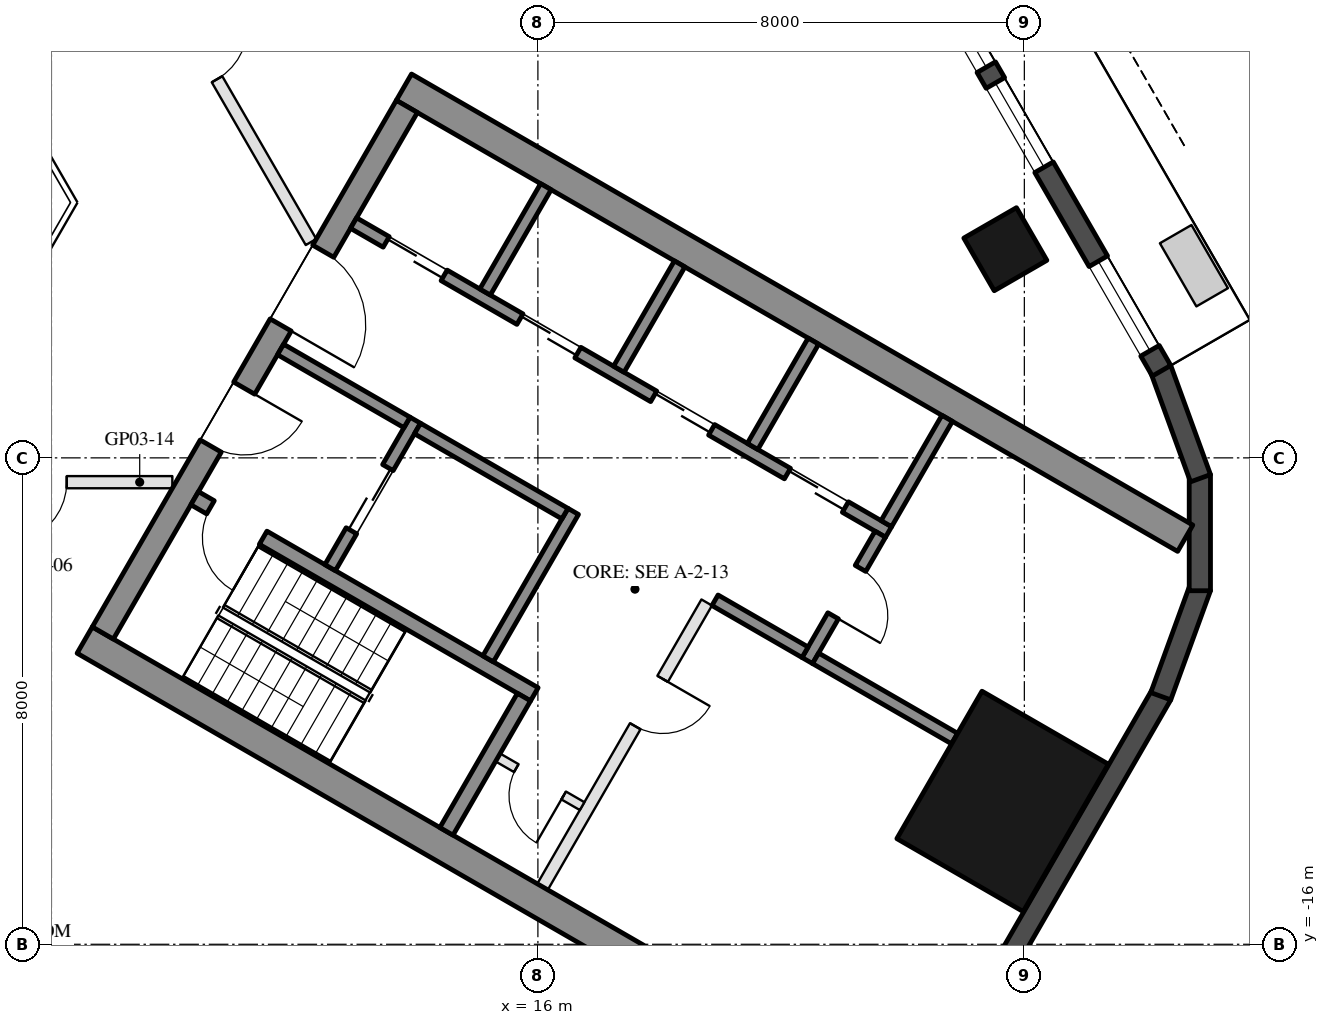
"""IFC4 building model, lengths in metres.
Left out: names, types, materials, properties, quantities, classifications, styles, units other than length and angle.
Written with IfcOpenShell. Run it as: python <this file> out.ifc"""

import sys

from ifc_helpers import new_model, si_unit, direction, frame, frame_2d, origin, origin_2d, place, context, subcontext, project, spatial, rectangle, hollow_rectangle, extrude, element, fill, save


model = new_model("IFC4")
c1 = context("Model", 3, precision=1e-05, world=origin(), true_north=direction((0.0, 1.0)))
c2 = subcontext(c1, "Body", "Model", "MODEL_VIEW")
j1 = project(units=[si_unit("LENGTHUNIT", "METRE"), si_unit("PLANEANGLEUNIT", "RADIAN")], contexts=[c1])
p1 = place(None, origin())
s1 = spatial("IfcSite", under=j1, at=p1, CompositionType="ELEMENT")
p2 = place(p1, origin())
s2 = spatial("IfcBuilding", under=s1, at=p2, CompositionType="ELEMENT")
p3 = place(p2, frame((0.0, 0.0, 65.0)))
s3 = spatial("IfcBuildingStorey", under=s2, at=p3, CompositionType="ELEMENT", Elevation=65.0)
p4 = place(p3, frame((23.688, -4.568, 0.0), z_axis=(0.0, 0.0, 1.0), x_axis=(-0.5, 0.866025403784, 0.0)))
e1 = element("IfcColumn", 1, at=p4, inside=s3, PredefinedType="COLUMN", context=c2, shape_type="SweptSolid", body=[
    extrude(hollow_rectangle(XDim=1.0, YDim=1.0, WallThickness=0.045, at=origin_2d()), origin(), (0.0, 0.0, 1.0), 3.7),
])
p5 = place(p3, frame((23.643, -13.65, 0.0), z_axis=(0.0, 0.0, 1.0), x_axis=(0.5, 0.866025403784, 0.0)))
e2 = element("IfcColumn", 2, at=p5, inside=s3, PredefinedType="COLUMN", context=c2, shape_type="SweptSolid", body=[
    extrude(hollow_rectangle(XDim=2.8, YDim=2.4, WallThickness=0.07, at=origin_2d()), origin(), (0.0, 0.0, 1.0), 3.7),
])
p6 = place(p3, frame((23.427, -16.792, 0.0), z_axis=(0.0, 0.0, 1.0), x_axis=(0.500018773155, 0.866014564827, 0.0)))
e3 = element("IfcWall", 3, at=p6, inside=s3, PredefinedType="SOLIDWALL", context=c2, shape_type="SweptSolid", body=[
    extrude(rectangle(XDim=5.658, YDim=0.35, at=frame_2d((2.829, 0.0))), origin(), (0.0, 0.0, 1.0), 3.55),
])
for number, where, z_axis, x_axis in (
    (4, (26.244, -11.92, 0.0), (0.0, 0.0, 1.0), (0.342, 0.94, 0.0)),
    (5, (26.886, -10.185, 0.0), (0.0, 0.0, 1.0), (0.0, 1.0, 0.0)),
    (6, (26.897, -8.335, 0.0), (0.0, 0.0, 1.0), (-0.342, 0.94, 0.0)),
):
    element("IfcWall", number, at=place(p3, frame(where, z_axis=z_axis, x_axis=x_axis)), inside=s3, PredefinedType="SOLIDWALL", context=c2, shape_type="SweptSolid", body=[
        extrude(rectangle(XDim=1.91, YDim=0.35, at=frame_2d((0.955, 0.0))), origin(), (0.0, 0.0, 1.0), 3.55),
    ])
p7 = place(p3, frame((26.257, -6.567, 0.0), z_axis=(0.0, 0.0, 1.0), x_axis=(-0.500023526245, 0.866011820475, 0.0)))
e7 = element("IfcWall", 7, at=p7, inside=s3, PredefinedType="SOLIDWALL", context=c2, shape_type="SweptSolid", body=[
    extrude(rectangle(XDim=11.816, YDim=0.35, at=frame_2d((5.908, 0.0))), origin(), (0.0, 0.0, 1.0), 3.55),
])
p8 = place(p7, frame((0.38, 0.0, 0.3)))
e8 = element("IfcOpeningElement", 8, at=p8, cuts=e7, PredefinedType="OPENING", context=c2, shape_type="SweptSolid", body=[
    extrude(rectangle(XDim=1.7, YDim=2.65, at=frame_2d((0.85, 1.325))), frame((0.0, 0.185, 0.0), z_axis=(0.0, -1.0, 0.0), x_axis=(1.0, 0.0, 0.0)), (0.0, 0.0, 1.0), 0.37),
])
p9 = place(p7, frame((7.666, 0.0, 0.0)))
e9 = element("IfcOpeningElement", 9, at=p9, cuts=e7, PredefinedType="OPENING", context=c2, shape_type="SweptSolid", body=[
    extrude(rectangle(XDim=2.4, YDim=2.4, at=frame_2d((1.2, 1.2))), frame((0.0, 0.185, 0.0), z_axis=(0.0, -1.0, 0.0), x_axis=(1.0, 0.0, 0.0)), (0.0, 0.0, 1.0), 0.37),
])
p10 = place(p7, frame((3.865, 0.0, 0.3)))
e10 = element("IfcOpeningElement", 10, at=p10, cuts=e7, PredefinedType="OPENING", context=c2, shape_type="SweptSolid", body=[
    extrude(rectangle(XDim=1.6, YDim=2.65, at=frame_2d((0.8, 1.325))), frame((0.0, 0.185, 0.0), z_axis=(0.0, -1.0, 0.0), x_axis=(1.0, 0.0, 0.0)), (0.0, 0.0, 1.0), 0.37),
])
p11 = place(p7, frame((5.765, 0.0, 0.3)))
e11 = element("IfcOpeningElement", 11, at=p11, cuts=e7, PredefinedType="OPENING", context=c2, shape_type="SweptSolid", body=[
    extrude(rectangle(XDim=1.6, YDim=2.65, at=frame_2d((0.8, 1.325))), frame((0.0, 0.185, 0.0), z_axis=(0.0, -1.0, 0.0), x_axis=(1.0, 0.0, 0.0)), (0.0, 0.0, 1.0), 0.37),
])
for number, where, z_axis, x_axis in (
    (12, (8.547, -10.997, 0.0), (0.0, 0.0, 1.0), (0.866, -0.5, 0.0)),
    (13, (13.797, -1.903, 0.0), (0.0, 0.0, 1.0), (0.866, -0.5, 0.0)),
):
    element("IfcWall", number, at=place(p3, frame(where, z_axis=z_axis, x_axis=x_axis)), inside=s3, PredefinedType="SHEAR", context=c2, shape_type="SweptSolid", body=[
        extrude(rectangle(XDim=14.837, YDim=0.5, at=frame_2d((7.418, 0.0))), origin(), (0.0, 0.0, 1.0), 3.5),
    ])
p12 = place(p3, frame((8.845, -10.88, 0.0), z_axis=(0.0, 0.0, 1.0), x_axis=(0.500004234368, 0.866022959057, 0.0)))
e14 = element("IfcWall", 14, at=p12, inside=s3, PredefinedType="SHEAR", context=c2, shape_type="SweptSolid", body=[
    extrude(rectangle(XDim=10.0, YDim=0.4, at=frame_2d((5.0, 0.0))), origin(), (0.0, 0.0, 1.0), 3.5),
])
p13 = place(p12, frame((3.55, 0.0, 0.0)))
e15 = element("IfcOpeningElement", 15, at=p13, cuts=e14, PredefinedType="OPENING", context=c2, shape_type="SweptSolid", body=[
    extrude(rectangle(XDim=1.1, YDim=2.1, at=frame_2d((0.55, 1.05))), frame((0.0, 0.21, 0.0), z_axis=(0.0, -1.0, 0.0), x_axis=(1.0, 0.0, 0.0)), (0.0, 0.0, 1.0), 0.42),
])
p14 = place(p12, frame((5.85, 0.0, 0.0)))
e16 = element("IfcOpeningElement", 16, at=p14, cuts=e14, PredefinedType="OPENING", context=c2, shape_type="SweptSolid", body=[
    extrude(rectangle(XDim=1.4, YDim=2.1, at=frame_2d((0.7, 1.05))), frame((0.0, 0.21, 0.0), z_axis=(0.0, -1.0, 0.0), x_axis=(1.0, 0.0, 0.0)), (0.0, 0.0, 1.0), 0.42),
])
p15 = place(p3, frame((10.356, -8.664, 0.0), z_axis=(0.0, 0.0, 1.0), x_axis=(0.866028629588, -0.499994412703, 0.0)))
e17 = element("IfcWall", 17, at=p15, inside=s3, PredefinedType="SHEAR", context=c2, shape_type="SweptSolid", body=[
    extrude(rectangle(XDim=6.45, YDim=0.25, at=frame_2d((3.225, 0.0))), origin(), (0.0, 0.0, 1.0), 3.5),
])
p16 = place(p15, frame((0.3, 0.0, 0.0)))
e18 = element("IfcOpeningElement", 18, at=p16, cuts=e17, PredefinedType="OPENING", context=c2, shape_type="SweptSolid", body=[
    extrude(rectangle(XDim=1.0, YDim=2.1, at=frame_2d((0.5, 1.05))), frame((0.0, 0.135, 0.0), z_axis=(0.0, -1.0, 0.0), x_axis=(1.0, 0.0, 0.0)), (0.0, 0.0, 1.0), 0.27),
])
p17 = place(p3, frame((14.496, -14.143, 0.0), z_axis=(0.0, 0.0, 1.0), x_axis=(0.500062241894, 0.865989465428, 0.0)))
e19 = element("IfcWall", 19, at=p17, inside=s3, PredefinedType="SHEAR", context=c2, shape_type="SweptSolid", body=[
    extrude(rectangle(XDim=2.55, YDim=0.25, at=frame_2d((1.275, 0.0))), origin(), (0.0, 0.0, 1.0), 3.5),
])
p18 = place(p3, frame((15.181, -11.305, 0.0), z_axis=(0.0, 0.0, 1.0), x_axis=(0.49994636267, 0.866056369097, 0.0)))
e20 = element("IfcWall", 20, at=p18, inside=s3, PredefinedType="SHEAR", context=c2, shape_type="SweptSolid", body=[
    extrude(rectangle(XDim=2.8, YDim=0.2, at=frame_2d((1.4, 0.0))), origin(), (0.0, 0.0, 1.0), 3.5),
])
p19 = place(p3, frame((12.583, -9.805, 0.0), z_axis=(0.0, 0.0, 1.0), x_axis=(0.49994636267, 0.866056369097, 0.0)))
e21 = element("IfcWall", 21, at=p19, inside=s3, PredefinedType="SHEAR", context=c2, shape_type="SweptSolid", body=[
    extrude(rectangle(XDim=2.8, YDim=0.2, at=frame_2d((1.4, 0.0))), origin(), (0.0, 0.0, 1.0), 3.5),
])
p20 = place(p19, frame((0.7, 0.0, 0.0)))
e22 = element("IfcOpeningElement", 22, at=p20, cuts=e21, PredefinedType="OPENING", context=c2, shape_type="SweptSolid", body=[
    extrude(rectangle(XDim=1.2, YDim=2.1, at=frame_2d((0.6, 1.05))), frame((0.0, 0.11, 0.0), z_axis=(0.0, -1.0, 0.0), x_axis=(1.0, 0.0, 0.0)), (0.0, 0.0, 1.0), 0.22),
])
p21 = place(p3, frame((11.768, -6.217, 0.0), z_axis=(0.0, 0.0, 1.0), x_axis=(0.866050077142, -0.499957262057, 0.0)))
e23 = element("IfcWall", 23, at=p21, inside=s3, PredefinedType="SHEAR", context=c2, shape_type="SweptSolid", body=[
    extrude(rectangle(XDim=2.4, YDim=0.2, at=frame_2d((1.2, 0.0))), origin(), (0.0, 0.0, 1.0), 3.5),
])
p22 = place(p3, frame((14.02, -7.517, 0.0), z_axis=(0.0, 0.0, 1.0), x_axis=(0.866034573852, -0.49998411664, 0.0)))
e24 = element("IfcWall", 24, at=p22, inside=s3, PredefinedType="SHEAR", context=c2, shape_type="SweptSolid", body=[
    extrude(rectangle(XDim=2.8, YDim=0.2, at=frame_2d((1.4, 0.0))), origin(), (0.0, 0.0, 1.0), 3.5),
])
p23 = place(p3, frame((12.968, -4.138, 0.0), z_axis=(0.0, 0.0, 1.0), x_axis=(0.866028328073, -0.49999493495, 0.0)))
e25 = element("IfcWall", 25, at=p23, inside=s3, PredefinedType="SHEAR", context=c2, shape_type="SweptSolid", body=[
    extrude(rectangle(XDim=10.16, YDim=0.2, at=frame_2d((5.08, 0.0))), origin(), (0.0, 0.0, 1.0), 3.5),
])
p24 = place(p23, frame((0.62, 0.0, 0.0)))
e26 = element("IfcOpeningElement", 26, at=p24, cuts=e25, PredefinedType="OPENING", context=c2, shape_type="SweptSolid", body=[
    extrude(rectangle(XDim=1.1, YDim=2.1, at=frame_2d((0.55, 1.05))), frame((0.0, 0.11, 0.0), z_axis=(0.0, -1.0, 0.0), x_axis=(1.0, 0.0, 0.0)), (0.0, 0.0, 1.0), 0.22),
])
p25 = place(p23, frame((3.16, 0.0, 0.0)))
e27 = element("IfcOpeningElement", 27, at=p25, cuts=e25, PredefinedType="OPENING", context=c2, shape_type="SweptSolid", body=[
    extrude(rectangle(XDim=1.1, YDim=2.1, at=frame_2d((0.55, 1.05))), frame((0.0, 0.11, 0.0), z_axis=(0.0, -1.0, 0.0), x_axis=(1.0, 0.0, 0.0)), (0.0, 0.0, 1.0), 0.22),
])
p26 = place(p23, frame((5.7, 0.0, 0.0)))
e28 = element("IfcOpeningElement", 28, at=p26, cuts=e25, PredefinedType="OPENING", context=c2, shape_type="SweptSolid", body=[
    extrude(rectangle(XDim=1.1, YDim=2.1, at=frame_2d((0.55, 1.05))), frame((0.0, 0.11, 0.0), z_axis=(0.0, -1.0, 0.0), x_axis=(1.0, 0.0, 0.0)), (0.0, 0.0, 1.0), 0.22),
])
p27 = place(p23, frame((8.24, 0.0, 0.0)))
e29 = element("IfcOpeningElement", 29, at=p27, cuts=e25, PredefinedType="OPENING", context=c2, shape_type="SweptSolid", body=[
    extrude(rectangle(XDim=1.1, YDim=2.1, at=frame_2d((0.55, 1.05))), frame((0.0, 0.11, 0.0), z_axis=(0.0, -1.0, 0.0), x_axis=(1.0, 0.0, 0.0)), (0.0, 0.0, 1.0), 0.22),
])
p28 = place(p3, frame((20.43, -11.333, 0.0), z_axis=(0.0, 0.0, 1.0), x_axis=(0.500001309137, 0.866024647952, 0.0)))
e30 = element("IfcWall", 30, at=p28, inside=s3, PredefinedType="SHEAR", context=c2, shape_type="SweptSolid", body=[
    extrude(rectangle(XDim=2.4, YDim=0.2, at=frame_2d((1.2, 0.0))), origin(), (0.0, 0.0, 1.0), 3.5),
])
p29 = place(p28, frame((0.85, 0.0, 0.0)))
e31 = element("IfcOpeningElement", 31, at=p29, cuts=e30, PredefinedType="OPENING", context=c2, shape_type="SweptSolid", body=[
    extrude(rectangle(XDim=0.9, YDim=2.1, at=frame_2d((0.45, 1.05))), frame((0.0, 0.11, 0.0), z_axis=(0.0, -1.0, 0.0), x_axis=(1.0, 0.0, 0.0)), (0.0, 0.0, 1.0), 0.22),
])
p30 = place(p3, frame((18.913, -10.342, 0.0), z_axis=(0.0, 0.0, 1.0), x_axis=(0.866038183914, -0.499977863513, 0.0)))
e32 = element("IfcWall", 32, at=p30, inside=s3, PredefinedType="SHEAR", context=c2, shape_type="SweptSolid", body=[
    extrude(rectangle(XDim=1.71, YDim=0.2, at=frame_2d((0.855, 0.0))), origin(), (0.0, 0.0, 1.0), 3.5),
])
for number, where, z_axis, x_axis in (
    (33, (15.131, -5.272, 0.0), (0.0, 0.0, 1.0), (0.5, 0.866, 0.0)),
    (34, (17.331, -6.542, 0.0), (0.0, 0.0, 1.0), (0.5, 0.866, 0.0)),
    (35, (19.531, -7.812, 0.0), (0.0, 0.0, 1.0), (0.5, 0.866, 0.0)),
    (36, (21.73, -9.082, 0.0), (0.0, 0.0, 1.0), (0.5, 0.866, 0.0)),
):
    element("IfcWall", number, at=place(p3, frame(where, z_axis=z_axis, x_axis=x_axis)), inside=s3, PredefinedType="SHEAR", context=c2, shape_type="SweptSolid", body=[
        extrude(rectangle(XDim=2.0, YDim=0.2, at=frame_2d((1.0, 0.0))), origin(), (0.0, 0.0, 1.0), 3.5),
    ])
p31 = place(p3, frame((20.567, -11.297, 0.0), z_axis=(0.0, 0.0, 1.0), x_axis=(0.866060851709, -0.499938597367, 0.0)))
e37 = element("IfcWall", 37, at=p31, inside=s3, PredefinedType="SHEAR", context=c2, shape_type="SweptSolid", body=[
    extrude(rectangle(XDim=2.64, YDim=0.2, at=frame_2d((1.32, 0.0))), origin(), (0.0, 0.0, 1.0), 3.5),
])
p32 = place(p3, frame((16.076, -15.055, 0.0), z_axis=(0.0, 0.0, 1.0), x_axis=(0.499995103361, 0.866028230842, 0.0)))
e38 = element("IfcWall", 38, at=p32, inside=s3, PredefinedType="PARTITIONING", context=c2, shape_type="SweptSolid", body=[
    extrude(rectangle(XDim=5.4, YDim=0.2, at=frame_2d((2.7, 0.0))), origin(), (0.0, 0.0, 1.0), 3.5),
])
p33 = place(p32, frame((3.05, 0.0, 0.0)))
e39 = element("IfcOpeningElement", 39, at=p33, cuts=e38, PredefinedType="OPENING", context=c2, shape_type="SweptSolid", body=[
    extrude(rectangle(XDim=0.9, YDim=2.1, at=frame_2d((0.45, 1.05))), frame((0.0, 0.11, 0.0), z_axis=(0.0, -1.0, 0.0), x_axis=(1.0, 0.0, 0.0)), (0.0, 0.0, 1.0), 0.22),
])
p34 = place(p3, frame((15.342, -12.928, 0.0), z_axis=(0.0, 0.0, 1.0), x_axis=(0.865989903783, -0.500061482766, 0.0)))
e40 = element("IfcWall", 40, at=p34, inside=s3, PredefinedType="PARTITIONING", context=c2, shape_type="SweptSolid", body=[
    extrude(rectangle(XDim=1.6, YDim=0.15, at=frame_2d((0.8, 0.0))), origin(), (0.0, 0.0, 1.0), 3.5),
])
p35 = place(p34, frame((0.35, 0.0, 0.0)))
e41 = element("IfcOpeningElement", 41, at=p35, cuts=e40, PredefinedType="OPENING", context=c2, shape_type="SweptSolid", body=[
    extrude(rectangle(XDim=0.9, YDim=2.1, at=frame_2d((0.45, 1.05))), frame((0.0, 0.085, 0.0), z_axis=(0.0, -1.0, 0.0), x_axis=(1.0, 0.0, 0.0)), (0.0, 0.0, 1.0), 0.17),
])
p36 = place(p3, frame((9.988, -8.4, 0.0), z_axis=(0.0, 0.0, 1.0), x_axis=(-1.0, 0.0, 0.0)))
e42 = element("IfcWall", 42, at=p36, inside=s3, PredefinedType="PARTITIONING", context=c2, shape_type="SweptSolid", body=[
    extrude(rectangle(XDim=4.474, YDim=0.2, at=frame_2d((2.237, 0.0))), origin(), (0.0, 0.0, 1.0), 2.95),
])
p37 = place(p36, frame((1.737, 0.0, 0.0)))
e43 = element("IfcOpeningElement", 43, at=p37, cuts=e42, PredefinedType="OPENING", context=c2, shape_type="SweptSolid", body=[
    extrude(rectangle(XDim=1.0, YDim=2.1, at=frame_2d((0.5, 1.05))), frame((0.0, 0.11, 0.0), z_axis=(0.0, -1.0, 0.0), x_axis=(1.0, 0.0, 0.0)), (0.0, 0.0, 1.0), 0.22),
])
p38 = place(p3, frame((8.677, 1.771, 0.0), z_axis=(0.0, 0.0, 1.0), x_axis=(0.50000293509, -0.866023709203, 0.0)))
e44 = element("IfcWall", 44, at=p38, inside=s3, PredefinedType="PARTITIONING", context=c2, shape_type="SweptSolid", body=[
    extrude(rectangle(XDim=7.183, YDim=0.2, at=frame_2d((3.592, 0.0))), origin(), (0.0, 0.0, 1.0), 2.95),
])
p39 = place(p38, frame((3.092, 0.0, 0.0)))
e45 = element("IfcOpeningElement", 45, at=p39, cuts=e44, PredefinedType="OPENING", context=c2, shape_type="SweptSolid", body=[
    extrude(rectangle(XDim=1.0, YDim=2.1, at=frame_2d((0.5, 1.05))), frame((0.0, 0.11, 0.0), z_axis=(0.0, -1.0, 0.0), x_axis=(1.0, 0.0, 0.0)), (0.0, 0.0, 1.0), 0.22),
])
p40 = place(p8, origin())
e46 = element("IfcWindow", 46, at=p40, inside=s3, PartitioningType="SINGLE_PANEL", PredefinedType="WINDOW", context=c2, shape_type="SweptSolid", body=[
    extrude(rectangle(XDim=1.7, YDim=2.65, at=frame_2d((0.85, 1.325))), frame((0.0, 0.03, 0.0), z_axis=(0.0, -1.0, 0.0), x_axis=(1.0, 0.0, 0.0)), (0.0, 0.0, 1.0), 0.06),
])
fill(e8, e46)
p41 = place(p10, origin())
e47 = element("IfcWindow", 47, at=p41, inside=s3, PartitioningType="SINGLE_PANEL", PredefinedType="WINDOW", context=c2, shape_type="SweptSolid", body=[
    extrude(rectangle(XDim=1.6, YDim=2.65, at=frame_2d((0.8, 1.325))), frame((0.0, 0.03, 0.0), z_axis=(0.0, -1.0, 0.0), x_axis=(1.0, 0.0, 0.0)), (0.0, 0.0, 1.0), 0.06),
])
fill(e10, e47)
p42 = place(p11, origin())
e48 = element("IfcWindow", 48, at=p42, inside=s3, PartitioningType="SINGLE_PANEL", PredefinedType="WINDOW", context=c2, shape_type="SweptSolid", body=[
    extrude(rectangle(XDim=1.6, YDim=2.65, at=frame_2d((0.8, 1.325))), frame((0.0, 0.03, 0.0), z_axis=(0.0, -1.0, 0.0), x_axis=(1.0, 0.0, 0.0)), (0.0, 0.0, 1.0), 0.06),
])
fill(e11, e48)
p43 = place(p20, origin())
e49 = element("IfcDoor", 49, at=p43, inside=s3, OperationType="DOUBLE_DOOR_SLIDING", PredefinedType="DOOR", context=c2, shape_type="SweptSolid", body=[
    extrude(rectangle(XDim=1.2, YDim=2.1, at=frame_2d((0.6, 1.05))), frame((0.0, 0.025, 0.0), z_axis=(0.0, -1.0, 0.0), x_axis=(1.0, 0.0, 0.0)), (0.0, 0.0, 1.0), 0.05),
])
fill(e22, e49)
p44 = place(p35, frame((0.9, 0.0, 0.0), z_axis=(0.0, 0.0, 1.0), x_axis=(-1.0, 0.0, 0.0)))
e50 = element("IfcDoor", 50, at=p44, inside=s3, OperationType="SINGLE_SWING_LEFT", PredefinedType="DOOR", context=c2, shape_type="SweptSolid", body=[
    extrude(rectangle(XDim=0.9, YDim=2.1, at=frame_2d((0.45, 1.05))), frame((0.0, 0.025, 0.0), z_axis=(0.0, -1.0, 0.0), x_axis=(1.0, 0.0, 0.0)), (0.0, 0.0, 1.0), 0.05),
])
fill(e41, e50)
p45 = place(p24, origin())
e51 = element("IfcDoor", 51, at=p45, inside=s3, OperationType="DOUBLE_DOOR_SLIDING", PredefinedType="DOOR", context=c2, shape_type="SweptSolid", body=[
    extrude(rectangle(XDim=1.1, YDim=2.1, at=frame_2d((0.55, 1.05))), frame((0.0, 0.025, 0.0), z_axis=(0.0, -1.0, 0.0), x_axis=(1.0, 0.0, 0.0)), (0.0, 0.0, 1.0), 0.05),
])
fill(e26, e51)
p46 = place(p25, origin())
e52 = element("IfcDoor", 52, at=p46, inside=s3, OperationType="DOUBLE_DOOR_SLIDING", PredefinedType="DOOR", context=c2, shape_type="SweptSolid", body=[
    extrude(rectangle(XDim=1.1, YDim=2.1, at=frame_2d((0.55, 1.05))), frame((0.0, 0.025, 0.0), z_axis=(0.0, -1.0, 0.0), x_axis=(1.0, 0.0, 0.0)), (0.0, 0.0, 1.0), 0.05),
])
fill(e27, e52)
p47 = place(p26, origin())
e53 = element("IfcDoor", 53, at=p47, inside=s3, OperationType="DOUBLE_DOOR_SLIDING", PredefinedType="DOOR", context=c2, shape_type="SweptSolid", body=[
    extrude(rectangle(XDim=1.1, YDim=2.1, at=frame_2d((0.55, 1.05))), frame((0.0, 0.025, 0.0), z_axis=(0.0, -1.0, 0.0), x_axis=(1.0, 0.0, 0.0)), (0.0, 0.0, 1.0), 0.05),
])
fill(e28, e53)
p48 = place(p27, origin())
e54 = element("IfcDoor", 54, at=p48, inside=s3, OperationType="DOUBLE_DOOR_SLIDING", PredefinedType="DOOR", context=c2, shape_type="SweptSolid", body=[
    extrude(rectangle(XDim=1.1, YDim=2.1, at=frame_2d((0.55, 1.05))), frame((0.0, 0.025, 0.0), z_axis=(0.0, -1.0, 0.0), x_axis=(1.0, 0.0, 0.0)), (0.0, 0.0, 1.0), 0.05),
])
fill(e29, e54)
p49 = place(p29, frame((0.9, 0.0, 0.0), z_axis=(0.0, 0.0, 1.0), x_axis=(-1.0, 0.0, 0.0)))
e55 = element("IfcDoor", 55, at=p49, inside=s3, OperationType="SINGLE_SWING_RIGHT", PredefinedType="DOOR", context=c2, shape_type="SweptSolid", body=[
    extrude(rectangle(XDim=0.9, YDim=2.1, at=frame_2d((0.45, 1.05))), frame((0.0, 0.025, 0.0), z_axis=(0.0, -1.0, 0.0), x_axis=(1.0, 0.0, 0.0)), (0.0, 0.0, 1.0), 0.05),
])
fill(e31, e55)
p50 = place(p33, frame((0.9, 0.0, 0.0), z_axis=(0.0, 0.0, 1.0), x_axis=(-1.0, 0.0, 0.0)))
e56 = element("IfcDoor", 56, at=p50, inside=s3, OperationType="SINGLE_SWING_LEFT", PredefinedType="DOOR", context=c2, shape_type="SweptSolid", body=[
    extrude(rectangle(XDim=0.9, YDim=2.1, at=frame_2d((0.45, 1.05))), frame((0.0, 0.025, 0.0), z_axis=(0.0, -1.0, 0.0), x_axis=(1.0, 0.0, 0.0)), (0.0, 0.0, 1.0), 0.05),
])
fill(e39, e56)
p51 = place(p13, frame((1.1, 0.0, 0.0), z_axis=(0.0, 0.0, 1.0), x_axis=(-1.0, 0.0, 0.0)))
e57 = element("IfcDoor", 57, at=p51, inside=s3, OperationType="SINGLE_SWING_LEFT", PredefinedType="DOOR", context=c2, shape_type="SweptSolid", body=[
    extrude(rectangle(XDim=1.1, YDim=2.1, at=frame_2d((0.55, 1.05))), frame((0.0, 0.025, 0.0), z_axis=(0.0, -1.0, 0.0), x_axis=(1.0, 0.0, 0.0)), (0.0, 0.0, 1.0), 0.05),
])
fill(e15, e57)
p52 = place(p14, frame((1.4, 0.0, 0.0), z_axis=(0.0, 0.0, 1.0), x_axis=(-1.0, 0.0, 0.0)))
e58 = element("IfcDoor", 58, at=p52, inside=s3, OperationType="DOUBLE_DOOR_SINGLE_SWING", PredefinedType="DOOR", context=c2, shape_type="SweptSolid", body=[
    extrude(rectangle(XDim=1.4, YDim=2.1, at=frame_2d((0.7, 1.05))), frame((0.0, 0.025, 0.0), z_axis=(0.0, -1.0, 0.0), x_axis=(1.0, 0.0, 0.0)), (0.0, 0.0, 1.0), 0.05),
])
fill(e16, e58)
p53 = place(p16, frame((1.0, 0.0, 0.0), z_axis=(0.0, 0.0, 1.0), x_axis=(-1.0, 0.0, 0.0)))
e59 = element("IfcDoor", 59, at=p53, inside=s3, OperationType="SINGLE_SWING_LEFT", PredefinedType="DOOR", context=c2, shape_type="SweptSolid", body=[
    extrude(rectangle(XDim=1.0, YDim=2.1, at=frame_2d((0.5, 1.05))), frame((0.0, 0.025, 0.0), z_axis=(0.0, -1.0, 0.0), x_axis=(1.0, 0.0, 0.0)), (0.0, 0.0, 1.0), 0.05),
])
fill(e18, e59)
p54 = place(p37, origin())
e60 = element("IfcDoor", 60, at=p54, inside=s3, OperationType="SINGLE_SWING_RIGHT", PredefinedType="DOOR", context=c2, shape_type="SweptSolid", body=[
    extrude(rectangle(XDim=1.0, YDim=2.1, at=frame_2d((0.5, 1.05))), frame((0.0, 0.025, 0.0), z_axis=(0.0, -1.0, 0.0), x_axis=(1.0, 0.0, 0.0)), (0.0, 0.0, 1.0), 0.05),
])
fill(e43, e60)
p55 = place(p39, origin())
e61 = element("IfcDoor", 61, at=p55, inside=s3, OperationType="SINGLE_SWING_LEFT", PredefinedType="DOOR", context=c2, shape_type="SweptSolid", body=[
    extrude(rectangle(XDim=1.0, YDim=2.1, at=frame_2d((0.5, 1.05))), frame((0.0, 0.025, 0.0), z_axis=(0.0, -1.0, 0.0), x_axis=(1.0, 0.0, 0.0)), (0.0, 0.0, 1.0), 0.05),
])
fill(e45, e61)
save(model, sys.argv[1])
